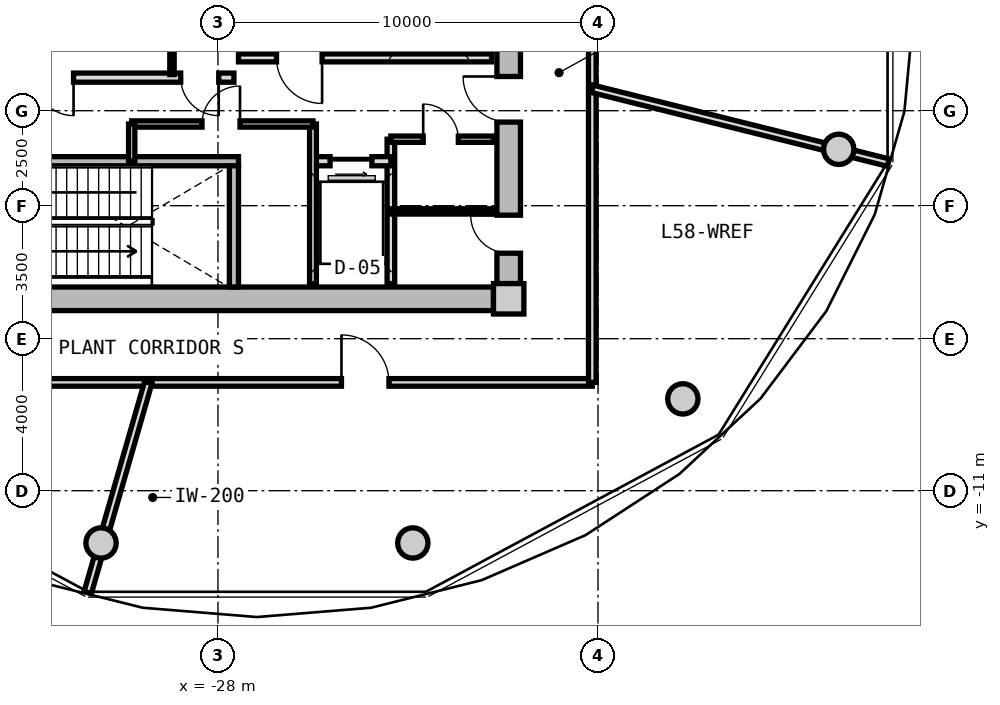
"""IFC4 building model, lengths in metres.
Left out: names, types, materials, properties, quantities, classifications, styles, units other than length and angle.
Written with IfcOpenShell. Run it as: python <this file> out.ifc"""

import sys

from ifc_helpers import new_model, si_unit, direction, frame, frame_2d, origin, origin_2d, place, context, subcontext, project, spatial, rectangle, circle, extrude, source, transform, mapped, element, fill, save


model = new_model("IFC4")
c1 = context("Model", 3, precision=1e-05, world=origin(), true_north=direction((0.0, 1.0)))
c2 = subcontext(c1, "Body", "Model", "MODEL_VIEW")
j1 = project(units=[si_unit("LENGTHUNIT", "METRE"), si_unit("PLANEANGLEUNIT", "RADIAN")], contexts=[c1])
p1 = place(None, origin())
s1 = spatial("IfcSite", under=j1, at=p1, CompositionType="ELEMENT")
p2 = place(p1, origin())
s2 = spatial("IfcBuilding", under=s1, at=p2, CompositionType="ELEMENT")
p3 = place(p2, frame((0.0, 0.0, 186.15)))
s3 = spatial("IfcBuildingStorey", under=s2, at=p3, CompositionType="ELEMENT", Elevation=186.15)
m1 = source(origin(), c2, "Body", "SweptSolid", [
    extrude(rectangle(XDim=0.8, YDim=0.8, at=origin_2d()), origin(), (0.0, 0.0, 1.0), 4.5),
])
p4 = place(p3, frame((-20.35, -5.95, 0.0), z_axis=(0.0, 0.0, 1.0), x_axis=(1.0, 0.0, 0.0)))
e1 = element("IfcColumn", 1, at=p4, inside=s3, PredefinedType="COLUMN", context=c2, shape_type="MappedRepresentation", body=[
    mapped(m1, transform((0.0, 0.0, 0.0), x_axis=(1.0, 0.0, 0.0), y_axis=(0.0, 1.0, 0.0), z_axis=(0.0, 0.0, 1.0), scale=1.0)),
])
m2 = source(origin(), c2, "Body", "SweptSolid", [
    extrude(rectangle(XDim=14.5, YDim=0.62, at=frame_2d((7.25, 0.0))), origin(), (0.0, 0.0, 1.0), 4.08),
])
p5 = place(p3, frame((-20.75, -5.95, 0.0), z_axis=(0.0, 0.0, 1.0), x_axis=(-1.0, 0.0, 0.0)))
e2 = element("IfcWall", 2, at=p5, inside=s3, PredefinedType="SHEAR", context=c2, shape_type="MappedRepresentation", body=[
    mapped(m2, transform((0.0, 0.0, 0.0), x_axis=(1.0, 0.0, 0.0), y_axis=(0.0, 1.0, 0.0), z_axis=(0.0, 0.0, 1.0), scale=1.0)),
])
m3 = source(origin(), c2, "Body", "SweptSolid", [
    extrude(rectangle(XDim=11.1, YDim=0.62, at=frame_2d((5.55, 0.0))), origin(), (0.0, 0.0, 1.0), 4.08),
])
p6 = place(p3, frame((-20.35, 5.55, 0.0), z_axis=(0.0, 0.0, 1.0), x_axis=(0.0, -1.0, 0.0)))
e3 = element("IfcWall", 3, at=p6, inside=s3, PredefinedType="SHEAR", context=c2, shape_type="MappedRepresentation", body=[
    mapped(m3, transform((0.0, 0.0, 0.0), x_axis=(1.0, 0.0, 0.0), y_axis=(0.0, 1.0, 0.0), z_axis=(0.0, 0.0, 1.0), scale=1.0)),
])
p7 = place(p6, frame((5.65, 0.0, 0.0)))
e4 = element("IfcOpeningElement", 4, at=p7, cuts=e3, PredefinedType="OPENING", context=c2, shape_type="SweptSolid", body=[
    extrude(rectangle(XDim=1.2, YDim=2.15, at=frame_2d((0.6, 1.075))), frame((0.0, 0.32, 0.0), z_axis=(0.0, -1.0, 0.0), x_axis=(1.0, 0.0, 0.0)), (0.0, 0.0, 1.0), 0.64),
])
p8 = place(p6, frame((9.3, 0.0, 0.0)))
e5 = element("IfcOpeningElement", 5, at=p8, cuts=e3, PredefinedType="OPENING", context=c2, shape_type="SweptSolid", body=[
    extrude(rectangle(XDim=1.0, YDim=2.1, at=frame_2d((0.5, 1.05))), frame((0.0, 0.32, 0.0), z_axis=(0.0, -1.0, 0.0), x_axis=(1.0, 0.0, 0.0)), (0.0, 0.0, 1.0), 0.64),
])
m4 = source(origin(), c2, "Body", "SweptSolid", [
    extrude(circle(Radius=0.4, at=origin_2d()), origin(), (0.0, 0.0, 1.0), 4.08),
])
for number, where, z_axis, x_axis in (
    (6, (-31.077, -12.375, 0.0), (0.0, 0.0, 1.0), (1.0, 0.0, 0.0)),
    (7, (-22.873, -12.375, 0.0), (0.0, 0.0, 1.0), (1.0, 0.0, 0.0)),
    (8, (-15.767, -8.584, 0.0), (0.0, 0.0, 1.0), (1.0, 0.0, 0.0)),
    (9, (-11.665, -2.016, 0.0), (0.0, 0.0, 1.0), (1.0, 0.0, 0.0)),
):
    element("IfcColumn", number, at=place(p3, frame(where, z_axis=z_axis, x_axis=x_axis)), inside=s3, PredefinedType="COLUMN", context=c2, shape_type="MappedRepresentation", body=[
        mapped(m4, transform((0.0, 0.0, 0.0), x_axis=(1.0, 0.0, 0.0), y_axis=(0.0, 1.0, 0.0), z_axis=(0.0, 0.0, 1.0), scale=1.0)),
    ])
m5 = source(origin(), c2, "Body", "SweptSolid", [
    extrude(rectangle(XDim=7.88, YDim=0.24, at=frame_2d((3.94, 0.0))), origin(), (0.0, 0.0, 1.0), 4.08),
])
p9 = place(p3, frame((-35.34, -2.33, 0.0), z_axis=(0.0, 0.0, 1.0), x_axis=(1.0, 0.0, 0.0)))
e10 = element("IfcWall", 10, at=p9, inside=s3, PredefinedType="PARTITIONING", context=c2, shape_type="MappedRepresentation", body=[
    mapped(m5, transform((0.0, 0.0, 0.0), x_axis=(1.0, 0.0, 0.0), y_axis=(0.0, 1.0, 0.0), z_axis=(0.0, 0.0, 1.0), scale=1.0)),
])
p10 = place(p9, frame((1.0, 0.0, 0.0)))
e11 = element("IfcOpeningElement", 11, at=p10, cuts=e10, PredefinedType="OPENING", context=c2, shape_type="SweptSolid", body=[
    extrude(rectangle(XDim=1.1, YDim=2.15, at=frame_2d((0.55, 1.075))), frame((0.0, 0.13, 0.0), z_axis=(0.0, -1.0, 0.0), x_axis=(1.0, 0.0, 0.0)), (0.0, 0.0, 1.0), 0.26),
])
m6 = source(origin(), c2, "Body", "SweptSolid", [
    extrude(rectangle(XDim=3.19, YDim=0.24, at=frame_2d((1.595, 0.0))), origin(), (0.0, 0.0, 1.0), 4.08),
])
p11 = place(p3, frame((-27.58, -5.64, 0.0), z_axis=(0.0, 0.0, 1.0), x_axis=(0.0, 1.0, 0.0)))
e12 = element("IfcWall", 12, at=p11, inside=s3, PredefinedType="PARTITIONING", context=c2, shape_type="MappedRepresentation", body=[
    mapped(m6, transform((0.0, 0.0, 0.0), x_axis=(1.0, 0.0, 0.0), y_axis=(0.0, 1.0, 0.0), z_axis=(0.0, 0.0, 1.0), scale=1.0)),
])
m7 = source(origin(), c2, "Body", "SweptSolid", [
    extrude(rectangle(XDim=5.0, YDim=0.24, at=frame_2d((2.5, 0.0))), origin(), (0.0, 0.0, 1.0), 4.065),
])
p12 = place(p3, frame((-24.14, 0.5, 0.0), z_axis=(0.0, 0.0, 1.0), x_axis=(0.0, 1.0, 0.0)))
e13 = element("IfcWall", 13, at=p12, inside=s3, PredefinedType="PARTITIONING", context=c2, shape_type="MappedRepresentation", body=[
    mapped(m7, transform((0.0, 0.0, 0.0), x_axis=(1.0, 0.0, 0.0), y_axis=(0.0, 1.0, 0.0), z_axis=(0.0, 0.0, 1.0), scale=1.0)),
])
p13 = place(p12, frame((3.05, 0.0, 0.0)))
e14 = element("IfcOpeningElement", 14, at=p13, cuts=e13, PredefinedType="OPENING", context=c2, shape_type="SweptSolid", body=[
    extrude(rectangle(XDim=1.3, YDim=2.2, at=frame_2d((0.65, 1.1))), frame((0.0, 0.13, 0.0), z_axis=(0.0, -1.0, 0.0), x_axis=(1.0, 0.0, 0.0)), (0.0, 0.0, 1.0), 0.26),
])
p14 = place(p12, frame((0.55, 0.0, 0.0)))
e15 = element("IfcOpeningElement", 15, at=p14, cuts=e13, PredefinedType="OPENING", context=c2, shape_type="SweptSolid", body=[
    extrude(rectangle(XDim=1.3, YDim=2.2, at=frame_2d((0.65, 1.1))), frame((0.0, 0.13, 0.0), z_axis=(0.0, -1.0, 0.0), x_axis=(1.0, 0.0, 0.0)), (0.0, 0.0, 1.0), 0.26),
])
m8 = source(origin(), c2, "Body", "SweptSolid", [
    extrude(rectangle(XDim=6.66, YDim=0.21, at=frame_2d((3.33, 0.0))), origin(), (0.0, 0.0, 1.0), 4.065),
])
p15 = place(p3, frame((-27.46, 0.39, 0.0), z_axis=(0.0, 0.0, 1.0), x_axis=(1.0, 0.0, 0.0)))
e16 = element("IfcWall", 16, at=p15, inside=s3, PredefinedType="PARTITIONING", context=c2, shape_type="MappedRepresentation", body=[
    mapped(m8, transform((0.0, 0.0, 0.0), x_axis=(1.0, 0.0, 0.0), y_axis=(0.0, 1.0, 0.0), z_axis=(0.0, 0.0, 1.0), scale=1.0)),
])
p16 = place(p15, frame((1.0, 0.0, 0.0)))
e17 = element("IfcOpeningElement", 17, at=p16, cuts=e16, PredefinedType="OPENING", context=c2, shape_type="SweptSolid", body=[
    extrude(rectangle(XDim=1.2, YDim=2.15, at=frame_2d((0.6, 1.075))), frame((0.0, 0.115, 0.0), z_axis=(0.0, -1.0, 0.0), x_axis=(1.0, 0.0, 0.0)), (0.0, 0.0, 1.0), 0.23),
])
m9 = source(origin(), c2, "Body", "SweptSolid", [
    extrude(rectangle(XDim=7.62, YDim=0.24, at=frame_2d((3.81, 0.0))), origin(), (0.0, 0.0, 1.0), 4.065),
])
p17 = place(p3, frame((-35.2, -0.13, 0.0), z_axis=(0.0, 0.0, 1.0), x_axis=(1.0, 0.0, 0.0)))
e18 = element("IfcWall", 18, at=p17, inside=s3, PredefinedType="PARTITIONING", context=c2, shape_type="MappedRepresentation", body=[
    mapped(m9, transform((0.0, 0.0, 0.0), x_axis=(1.0, 0.0, 0.0), y_axis=(0.0, 1.0, 0.0), z_axis=(0.0, 0.0, 1.0), scale=1.0)),
])
p18 = place(p17, frame((6.22, 0.0, 0.0)))
e19 = element("IfcOpeningElement", 19, at=p18, cuts=e18, PredefinedType="OPENING", context=c2, shape_type="SweptSolid", body=[
    extrude(rectangle(XDim=1.0, YDim=2.1, at=frame_2d((0.5, 1.05))), frame((0.0, 0.13, 0.0), z_axis=(0.0, -1.0, 0.0), x_axis=(1.0, 0.0, 0.0)), (0.0, 0.0, 1.0), 0.26),
])
p19 = place(p17, frame((2.4, 0.0, 0.0)))
e20 = element("IfcOpeningElement", 20, at=p19, cuts=e18, PredefinedType="OPENING", context=c2, shape_type="SweptSolid", body=[
    extrude(rectangle(XDim=1.0, YDim=2.1, at=frame_2d((0.5, 1.05))), frame((0.0, 0.13, 0.0), z_axis=(0.0, -1.0, 0.0), x_axis=(1.0, 0.0, 0.0)), (0.0, 0.0, 1.0), 0.26),
])
m10 = source(origin(), c2, "Body", "SweptSolid", [
    extrude(rectangle(XDim=2.33, YDim=0.115, at=frame_2d((1.165, 0.0))), origin(), (0.0, 0.0, 1.0), 4.065),
])
p20 = place(p3, frame((-29.21, -0.05, 0.0), z_axis=(0.0, 0.0, 1.0), x_axis=(0.0, 1.0, 0.0)))
e21 = element("IfcWall", 21, at=p20, inside=s3, PredefinedType="PARTITIONING", context=c2, shape_type="MappedRepresentation", body=[
    mapped(m10, transform((0.0, 0.0, 0.0), x_axis=(1.0, 0.0, 0.0), y_axis=(0.0, 1.0, 0.0), z_axis=(0.0, 0.0, 1.0), scale=1.0)),
])
m11 = source(origin(), c2, "Body", "SweptSolid", [
    extrude(rectangle(XDim=3.8, YDim=0.2, at=frame_2d((1.9, 0.0))), origin(), (0.0, 0.0, 1.0), 4.065),
])
p21 = place(p3, frame((-23.45, -5.55, 0.0), z_axis=(0.0, 0.0, 1.0), x_axis=(0.0, 1.0, 0.0)))
e22 = element("IfcWall", 22, at=p21, inside=s3, PredefinedType="PARTITIONING", context=c2, shape_type="MappedRepresentation", body=[
    mapped(m11, transform((0.0, 0.0, 0.0), x_axis=(1.0, 0.0, 0.0), y_axis=(0.0, 1.0, 0.0), z_axis=(0.0, 0.0, 1.0), scale=1.0)),
])
m12 = source(origin(), c2, "Body", "SweptSolid", [
    extrude(rectangle(XDim=2.05, YDim=0.24, at=frame_2d((1.025, 0.0))), origin(), (0.0, 0.0, 1.0), 4.065),
])
p22 = place(p3, frame((-25.5, -2.33, 0.0), z_axis=(0.0, 0.0, 1.0), x_axis=(1.0, 0.0, 0.0)))
e23 = element("IfcWall", 23, at=p22, inside=s3, PredefinedType="PARTITIONING", context=c2, shape_type="MappedRepresentation", body=[
    mapped(m12, transform((0.0, 0.0, 0.0), x_axis=(1.0, 0.0, 0.0), y_axis=(0.0, 1.0, 0.0), z_axis=(0.0, 0.0, 1.0), scale=1.0)),
])
p23 = place(p22, frame((0.45, 0.0, 0.0)))
e24 = element("IfcOpeningElement", 24, at=p23, cuts=e23, PredefinedType="OPENING", context=c2, shape_type="SweptSolid", body=[
    extrude(rectangle(XDim=1.1, YDim=2.2, at=frame_2d((0.55, 1.1))), frame((0.0, 0.13, 0.0), z_axis=(0.0, -1.0, 0.0), x_axis=(1.0, 0.0, 0.0)), (0.0, 0.0, 1.0), 0.26),
])
m13 = source(origin(), c2, "Body", "SweptSolid", [
    extrude(rectangle(XDim=4.2, YDim=0.18, at=frame_2d((2.1, 0.0))), origin(), (0.0, 0.0, 1.0), 4.065),
])
p24 = place(p3, frame((-25.5, -5.55, 0.0), z_axis=(0.0, 0.0, 1.0), x_axis=(0.0, 1.0, 0.0)))
e25 = element("IfcWall", 25, at=p24, inside=s3, PredefinedType="PARTITIONING", context=c2, shape_type="MappedRepresentation", body=[
    mapped(m13, transform((0.0, 0.0, 0.0), x_axis=(1.0, 0.0, 0.0), y_axis=(0.0, 1.0, 0.0), z_axis=(0.0, 0.0, 1.0), scale=1.0)),
])
m14 = source(origin(), c2, "Body", "SweptSolid", [
    extrude(rectangle(XDim=4.77, YDim=0.165, at=frame_2d((2.385, 0.0))), origin(), (0.0, 0.0, 1.0), 4.065),
])
p25 = place(p3, frame((-30.27, -1.35, 0.0), z_axis=(0.0, 0.0, 1.0), x_axis=(1.0, 0.0, 0.0)))
e26 = element("IfcWall", 26, at=p25, inside=s3, PredefinedType="PARTITIONING", context=c2, shape_type="MappedRepresentation", body=[
    mapped(m14, transform((0.0, 0.0, 0.0), x_axis=(1.0, 0.0, 0.0), y_axis=(0.0, 1.0, 0.0), z_axis=(0.0, 0.0, 1.0), scale=1.0)),
])
p26 = place(p25, frame((1.85, 0.0, 0.0)))
e27 = element("IfcOpeningElement", 27, at=p26, cuts=e26, PredefinedType="OPENING", context=c2, shape_type="SweptSolid", body=[
    extrude(rectangle(XDim=1.0, YDim=2.1, at=frame_2d((0.5, 1.05))), frame((0.0, 0.093, 0.0), z_axis=(0.0, -1.0, 0.0), x_axis=(1.0, 0.0, 0.0)), (0.0, 0.0, 1.0), 0.185),
])
m15 = source(origin(), c2, "Body", "SweptSolid", [
    extrude(rectangle(XDim=0.98, YDim=0.165, at=frame_2d((0.49, 0.0))), origin(), (0.0, 0.0, 1.0), 4.065),
])
p27 = place(p3, frame((-30.27, -2.33, 0.0), z_axis=(0.0, 0.0, 1.0), x_axis=(0.0, 1.0, 0.0)))
e28 = element("IfcWall", 28, at=p27, inside=s3, PredefinedType="PARTITIONING", context=c2, shape_type="MappedRepresentation", body=[
    mapped(m15, transform((0.0, 0.0, 0.0), x_axis=(1.0, 0.0, 0.0), y_axis=(0.0, 1.0, 0.0), z_axis=(0.0, 0.0, 1.0), scale=1.0)),
])
m16 = source(origin(), c2, "Body", "SweptSolid", [
    extrude(rectangle(XDim=2.7, YDim=0.165, at=frame_2d((1.35, 0.0))), origin(), (0.0, 0.0, 1.0), 4.065),
])
p28 = place(p3, frame((-23.45, -1.75, 0.0), z_axis=(0.0, 0.0, 1.0), x_axis=(1.0, 0.0, 0.0)))
e29 = element("IfcWall", 29, at=p28, inside=s3, PredefinedType="PARTITIONING", context=c2, shape_type="MappedRepresentation", body=[
    mapped(m16, transform((0.0, 0.0, 0.0), x_axis=(1.0, 0.0, 0.0), y_axis=(0.0, 1.0, 0.0), z_axis=(0.0, 0.0, 1.0), scale=1.0)),
])
p29 = place(p28, frame((0.85, 0.0, 0.0)))
e30 = element("IfcOpeningElement", 30, at=p29, cuts=e29, PredefinedType="OPENING", context=c2, shape_type="SweptSolid", body=[
    extrude(rectangle(XDim=0.925, YDim=2.1, at=frame_2d((0.462, 1.05))), frame((0.0, 0.093, 0.0), z_axis=(0.0, -1.0, 0.0), x_axis=(1.0, 0.0, 0.0)), (0.0, 0.0, 1.0), 0.185),
])
m17 = source(origin(), c2, "Body", "SweptSolid", [
    extrude(rectangle(XDim=2.7, YDim=0.14, at=frame_2d((1.35, 0.0))), origin(), (0.0, 0.0, 1.0), 4.065),
])
p30 = place(p3, frame((-23.45, -3.65, 0.0), z_axis=(0.0, 0.0, 1.0), x_axis=(1.0, 0.0, 0.0)))
e31 = element("IfcWall", 31, at=p30, inside=s3, PredefinedType="PARTITIONING", context=c2, shape_type="MappedRepresentation", body=[
    mapped(m17, transform((0.0, 0.0, 0.0), x_axis=(1.0, 0.0, 0.0), y_axis=(0.0, 1.0, 0.0), z_axis=(0.0, 0.0, 1.0), scale=1.0)),
])
m18 = source(origin(), c2, "Body", "SweptSolid", [
    extrude(rectangle(XDim=19.7, YDim=0.2, at=frame_2d((9.85, 0.0))), origin(), (0.0, 0.0, 1.0), 4.065),
])
p31 = place(p3, frame((-18.15, -8.15, 0.0), z_axis=(0.0, 0.0, 1.0), x_axis=(-1.0, 0.0, 0.0)))
e32 = element("IfcWall", 32, at=p31, inside=s3, PredefinedType="PARTITIONING", context=c2, shape_type="MappedRepresentation", body=[
    mapped(m18, transform((0.0, 0.0, 0.0), x_axis=(1.0, 0.0, 0.0), y_axis=(0.0, 1.0, 0.0), z_axis=(0.0, 0.0, 1.0), scale=1.0)),
])
p32 = place(p31, frame((5.35, 0.0, 0.0)))
e33 = element("IfcOpeningElement", 33, at=p32, cuts=e32, PredefinedType="OPENING", context=c2, shape_type="SweptSolid", body=[
    extrude(rectangle(XDim=1.25, YDim=2.2, at=frame_2d((0.625, 1.1))), frame((0.0, 0.11, 0.0), z_axis=(0.0, -1.0, 0.0), x_axis=(1.0, 0.0, 0.0)), (0.0, 0.0, 1.0), 0.22),
])
m19 = source(origin(), c2, "Body", "SweptSolid", [
    extrude(rectangle(XDim=16.3, YDim=0.2, at=frame_2d((8.15, 0.0))), origin(), (0.0, 0.0, 1.0), 4.065),
])
p33 = place(p3, frame((-18.15, 8.15, 0.0), z_axis=(0.0, 0.0, 1.0), x_axis=(0.0, -1.0, 0.0)))
e34 = element("IfcWall", 34, at=p33, inside=s3, PredefinedType="PARTITIONING", context=c2, shape_type="MappedRepresentation", body=[
    mapped(m19, transform((0.0, 0.0, 0.0), x_axis=(1.0, 0.0, 0.0), y_axis=(0.0, 1.0, 0.0), z_axis=(0.0, 0.0, 1.0), scale=1.0)),
])
p34 = place(p33, frame((3.939, 0.0, 0.0)))
e35 = element("IfcOpeningElement", 35, at=p34, cuts=e34, PredefinedType="OPENING", context=c2, shape_type="SweptSolid", body=[
    extrude(rectangle(XDim=1.0, YDim=2.1, at=frame_2d((0.5, 1.05))), frame((0.0, 0.11, 0.0), z_axis=(0.0, -1.0, 0.0), x_axis=(1.0, 0.0, 0.0)), (0.0, 0.0, 1.0), 0.22),
])
m20 = source(origin(), c2, "Body", "SweptSolid", [
    extrude(rectangle(XDim=5.754, YDim=0.2, at=frame_2d((2.877, 0.0))), origin(), (0.0, 0.0, 1.0), 2.515),
])
p35 = place(p3, frame((-29.834, -8.15, 0.0), z_axis=(0.0, 0.0, 1.0), x_axis=(-0.276793809121, -0.960929335192, 0.0)))
e36 = element("IfcWall", 36, at=p35, inside=s3, PredefinedType="PARTITIONING", context=c2, shape_type="MappedRepresentation", body=[
    mapped(m20, transform((0.0, 0.0, 0.0), x_axis=(1.0, 0.0, 0.0), y_axis=(0.0, 1.0, 0.0), z_axis=(0.0, 0.0, 1.0), scale=1.0)),
])
m21 = source(origin(), c2, "Body", "SweptSolid", [
    extrude(rectangle(XDim=8.027, YDim=0.2, at=frame_2d((4.014, 0.0))), origin(), (0.0, 0.0, 1.0), 4.065),
])
p36 = place(p3, frame((-18.15, -0.424, 0.0), z_axis=(0.0, 0.0, 1.0), x_axis=(0.970312225041, -0.241855713053, 0.0)))
e37 = element("IfcWall", 37, at=p36, inside=s3, PredefinedType="PARTITIONING", context=c2, shape_type="MappedRepresentation", body=[
    mapped(m21, transform((0.0, 0.0, 0.0), x_axis=(1.0, 0.0, 0.0), y_axis=(0.0, 1.0, 0.0), z_axis=(0.0, 0.0, 1.0), scale=1.0)),
])
m22 = source(origin(), c2, "Body", "SweptSolid", [
    extrude(rectangle(XDim=1.2, YDim=2.15, at=frame_2d((0.6, 1.075))), frame((0.0, 0.025, 0.0), z_axis=(0.0, -1.0, 0.0), x_axis=(1.0, 0.0, 0.0)), (0.0, 0.0, 1.0), 0.05),
])
p37 = place(p16, frame((1.2, 0.0, 0.0), z_axis=(0.0, 0.0, 1.0), x_axis=(-1.0, 0.0, 0.0)))
e38 = element("IfcDoor", 38, at=p37, inside=s3, OperationType="SINGLE_SWING_LEFT", PredefinedType="DOOR", context=c2, shape_type="MappedRepresentation", body=[
    mapped(m22, transform((0.0, 0.0, 0.0), x_axis=(1.0, 0.0, 0.0), y_axis=(0.0, 1.0, 0.0), z_axis=(0.0, 0.0, 1.0), scale=1.0)),
])
fill(e17, e38)
p38 = place(p7, frame((1.2, 0.0, 0.0), z_axis=(0.0, 0.0, 1.0), x_axis=(-1.0, 0.0, 0.0)))
e39 = element("IfcDoor", 39, at=p38, inside=s3, OperationType="SINGLE_SWING_RIGHT", PredefinedType="DOOR", context=c2, shape_type="MappedRepresentation", body=[
    mapped(m22, transform((0.0, 0.0, 0.0), x_axis=(1.0, 0.0, 0.0), y_axis=(0.0, 1.0, 0.0), z_axis=(0.0, 0.0, 1.0), scale=1.0)),
])
fill(e4, e39)
m23 = source(origin(), c2, "Body", "SweptSolid", [
    extrude(rectangle(XDim=1.0, YDim=2.1, at=frame_2d((0.5, 1.05))), frame((0.0, 0.025, 0.0), z_axis=(0.0, -1.0, 0.0), x_axis=(1.0, 0.0, 0.0)), (0.0, 0.0, 1.0), 0.05),
])
p39 = place(p18, frame((1.0, 0.0, 0.0), z_axis=(0.0, 0.0, 1.0), x_axis=(-1.0, 0.0, 0.0)))
e40 = element("IfcDoor", 40, at=p39, inside=s3, OperationType="SINGLE_SWING_LEFT", PredefinedType="DOOR", context=c2, shape_type="MappedRepresentation", body=[
    mapped(m23, transform((0.0, 0.0, 0.0), x_axis=(1.0, 0.0, 0.0), y_axis=(0.0, 1.0, 0.0), z_axis=(0.0, 0.0, 1.0), scale=1.0)),
])
fill(e19, e40)
p40 = place(p19, frame((1.0, 0.0, 0.0), z_axis=(0.0, 0.0, 1.0), x_axis=(-1.0, 0.0, 0.0)))
e41 = element("IfcDoor", 41, at=p40, inside=s3, OperationType="SINGLE_SWING_LEFT", PredefinedType="DOOR", context=c2, shape_type="MappedRepresentation", body=[
    mapped(m23, transform((0.0, 0.0, 0.0), x_axis=(1.0, 0.0, 0.0), y_axis=(0.0, 1.0, 0.0), z_axis=(0.0, 0.0, 1.0), scale=1.0)),
])
fill(e20, e41)
m24 = source(origin(), c2, "Body", "SweptSolid", [
    extrude(rectangle(XDim=1.1, YDim=2.2, at=frame_2d((0.55, 1.1))), frame((0.0, 0.025, 0.0), z_axis=(0.0, -1.0, 0.0), x_axis=(1.0, 0.0, 0.0)), (0.0, 0.0, 1.0), 0.05),
])
p41 = place(p23, frame((1.1, 0.0, 0.0), z_axis=(0.0, 0.0, 1.0), x_axis=(-1.0, 0.0, 0.0)))
e42 = element("IfcDoor", 42, at=p41, inside=s3, OperationType="SLIDING_TO_RIGHT", PredefinedType="DOOR", context=c2, shape_type="MappedRepresentation", body=[
    mapped(m24, transform((0.0, 0.0, 0.0), x_axis=(1.0, 0.0, 0.0), y_axis=(0.0, 1.0, 0.0), z_axis=(0.0, 0.0, 1.0), scale=1.0)),
])
fill(e24, e42)
p42 = place(p26, origin())
e43 = element("IfcDoor", 43, at=p42, inside=s3, OperationType="SINGLE_SWING_RIGHT", PredefinedType="DOOR", context=c2, shape_type="MappedRepresentation", body=[
    mapped(m23, transform((0.0, 0.0, 0.0), x_axis=(1.0, 0.0, 0.0), y_axis=(0.0, 1.0, 0.0), z_axis=(0.0, 0.0, 1.0), scale=1.0)),
])
fill(e27, e43)
m25 = source(origin(), c2, "Body", "SweptSolid", [
    extrude(rectangle(XDim=0.925, YDim=2.1, at=frame_2d((0.462, 1.05))), frame((0.0, 0.025, 0.0), z_axis=(0.0, -1.0, 0.0), x_axis=(1.0, 0.0, 0.0)), (0.0, 0.0, 1.0), 0.05),
])
p43 = place(p29, origin())
e44 = element("IfcDoor", 44, at=p43, inside=s3, OperationType="SINGLE_SWING_LEFT", PredefinedType="DOOR", context=c2, shape_type="MappedRepresentation", body=[
    mapped(m25, transform((0.0, 0.0, 0.0), x_axis=(1.0, 0.0, 0.0), y_axis=(0.0, 1.0, 0.0), z_axis=(0.0, 0.0, 1.0), scale=1.0)),
])
fill(e30, e44)
p44 = place(p8, frame((1.0, 0.0, 0.0), z_axis=(0.0, 0.0, 1.0), x_axis=(-1.0, 0.0, 0.0)))
e45 = element("IfcDoor", 45, at=p44, inside=s3, OperationType="SINGLE_SWING_RIGHT", PredefinedType="DOOR", context=c2, shape_type="MappedRepresentation", body=[
    mapped(m23, transform((0.0, 0.0, 0.0), x_axis=(1.0, 0.0, 0.0), y_axis=(0.0, 1.0, 0.0), z_axis=(0.0, 0.0, 1.0), scale=1.0)),
])
fill(e5, e45)
m26 = source(origin(), c2, "Body", "SweptSolid", [
    extrude(rectangle(XDim=1.25, YDim=2.2, at=frame_2d((0.625, 1.1))), frame((0.0, 0.025, 0.0), z_axis=(0.0, -1.0, 0.0), x_axis=(1.0, 0.0, 0.0)), (0.0, 0.0, 1.0), 0.05),
])
p45 = place(p32, frame((1.25, 0.0, 0.0), z_axis=(0.0, 0.0, 1.0), x_axis=(-1.0, 0.0, 0.0)))
e46 = element("IfcDoor", 46, at=p45, inside=s3, OperationType="SINGLE_SWING_LEFT", PredefinedType="DOOR", context=c2, shape_type="MappedRepresentation", body=[
    mapped(m26, transform((0.0, 0.0, 0.0), x_axis=(1.0, 0.0, 0.0), y_axis=(0.0, 1.0, 0.0), z_axis=(0.0, 0.0, 1.0), scale=1.0)),
])
fill(e33, e46)
save(model, sys.argv[1])
